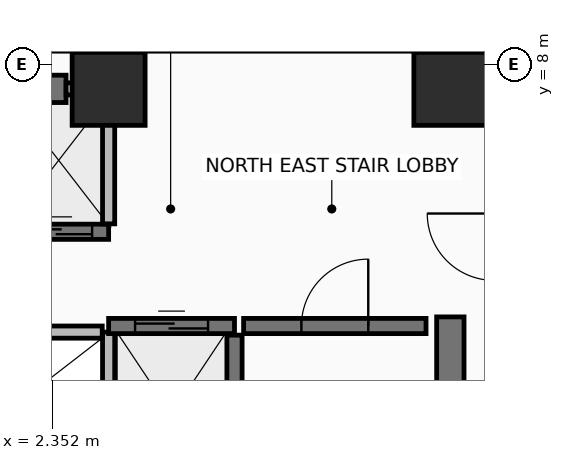
"""IFC4 building model, lengths in metres.
Left out: names, types, materials, properties, quantities, classifications, styles, units other than length and angle.
Written with IfcOpenShell. Run it as: python <this file> out.ifc"""

import sys

from ifc_helpers import new_model, si_unit, direction, frame, frame_2d, origin, origin_2d, place, context, subcontext, project, spatial, rectangle, extrude, element, fill, save


model = new_model("IFC4")
c1 = context("Model", 3, precision=1e-05, world=origin(), true_north=direction((0.0, 1.0)))
c2 = subcontext(c1, "Body", "Model", "MODEL_VIEW")
j1 = project(units=[si_unit("LENGTHUNIT", "METRE"), si_unit("PLANEANGLEUNIT", "RADIAN")], contexts=[c1])
p1 = place(None, origin())
s1 = spatial("IfcSite", under=j1, at=p1, CompositionType="ELEMENT")
p2 = place(p1, origin())
s2 = spatial("IfcBuilding", under=s1, at=p2, CompositionType="ELEMENT")
p3 = place(p2, frame((0.0, 0.0, 211.25)))
s3 = spatial("IfcBuildingStorey", under=s2, at=p3, CompositionType="ELEMENT", Elevation=211.25)
for number, where, z_axis, x_axis in (
    (1, (8.9, 7.6, 0.0), (0.0, 0.0, 1.0), (1.0, 0.0, 0.0)),
    (2, (3.28, 7.6, 0.0), (0.0, 0.0, 1.0), (1.0, 0.0, 0.0)),
):
    element("IfcColumn", number, at=place(p3, frame(where, z_axis=z_axis, x_axis=x_axis)), inside=s3, PredefinedType="COLUMN", context=c2, shape_type="SweptSolid", body=[
        extrude(rectangle(XDim=1.2, YDim=1.2, at=origin_2d()), origin(), (0.0, 0.0, 1.0), 3.6),
    ])
p4 = place(p3, frame((-2.8, 7.6, 0.0), z_axis=(0.0, 0.0, 1.0), x_axis=(1.0, 0.0, 0.0)))
e3 = element("IfcWall", 3, at=p4, inside=s3, PredefinedType="SHEAR", context=c2, shape_type="SweptSolid", body=[
    extrude(rectangle(XDim=5.38, YDim=0.45, at=frame_2d((2.69, 0.0))), origin(), (0.0, 0.0, 1.0), 3.42),
])
p5 = place(p3, frame((8.9, -6.85, 0.0), z_axis=(0.0, 0.0, 1.0), x_axis=(0.0, 1.0, 0.0)))
e4 = element("IfcWall", 4, at=p5, inside=s3, PredefinedType="SHEAR", context=c2, shape_type="SweptSolid", body=[
    extrude(rectangle(XDim=10.7, YDim=0.45, at=frame_2d((5.35, 0.0))), origin(), (0.0, 0.0, 1.0), 3.42),
])
p6 = place(p3, frame((5.35, -3.75, 0.0), z_axis=(0.0, 0.0, 1.0), x_axis=(0.0, 1.0, 0.0)))
e5 = element("IfcWall", 5, at=p6, inside=s3, PredefinedType="SHEAR", context=c2, shape_type="SweptSolid", body=[
    extrude(rectangle(XDim=7.3, YDim=0.25, at=frame_2d((3.65, 0.0))), origin(), (0.0, 0.0, 1.0), 3.42),
])
p7 = place(p3, frame((5.5, 3.7, 0.0), z_axis=(0.0, 0.0, 1.0), x_axis=(1.0, 0.0, 0.0)))
e6 = element("IfcWall", 6, at=p7, inside=s3, PredefinedType="SHEAR", context=c2, shape_type="SweptSolid", body=[
    extrude(rectangle(XDim=3.0, YDim=0.25, at=frame_2d((1.5, 0.0))), origin(), (0.0, 0.0, 1.0), 3.42),
])
p8 = place(p7, frame((0.95, 0.0, 0.0)))
e7 = element("IfcOpeningElement", 7, at=p8, cuts=e6, PredefinedType="OPENING", context=c2, shape_type="SweptSolid", body=[
    extrude(rectangle(XDim=1.1, YDim=2.15, at=frame_2d((0.55, 1.075))), frame((0.0, 0.135, 0.0), z_axis=(0.0, -1.0, 0.0), x_axis=(1.0, 0.0, 0.0)), (0.0, 0.0, 1.0), 0.27),
])
p9 = place(p3, frame((1.637, 5.25, 0.0), z_axis=(0.0, 0.0, 1.0), x_axis=(1.0, 0.0, 0.0)))
e8 = element("IfcWall", 8, at=p9, inside=s3, PredefinedType="SHEAR", context=c2, shape_type="SweptSolid", body=[
    extrude(rectangle(XDim=1.643, YDim=0.25, at=frame_2d((0.821, 0.0))), origin(), (0.0, 0.0, 1.0), 3.42),
])
p10 = place(p9, frame((0.271, 0.0, 0.0)))
e9 = element("IfcOpeningElement", 9, at=p10, cuts=e8, PredefinedType="OPENING", context=c2, shape_type="SweptSolid", body=[
    extrude(rectangle(XDim=1.1, YDim=2.2, at=frame_2d((0.55, 1.1))), frame((0.0, 0.135, 0.0), z_axis=(0.0, -1.0, 0.0), x_axis=(1.0, 0.0, 0.0)), (0.0, 0.0, 1.0), 0.27),
])
p11 = place(p3, frame((2.58, 7.6, 0.0), z_axis=(0.0, 0.0, 1.0), x_axis=(1.0, 0.0, 0.0)))
e10 = element("IfcWall", 10, at=p11, inside=s3, PredefinedType="PARTITIONING", context=c2, shape_type="SweptSolid", body=[
    extrude(rectangle(XDim=0.7, YDim=0.2, at=frame_2d((0.35, 0.0))), origin(), (0.0, 0.0, 1.0), 2.715),
])
p12 = place(p3, frame((3.28, 5.38, 0.0), z_axis=(0.0, 0.0, 1.0), x_axis=(0.0, 1.0, 0.0)))
e11 = element("IfcWall", 11, at=p12, inside=s3, PredefinedType="PARTITIONING", context=c2, shape_type="SweptSolid", body=[
    extrude(rectangle(XDim=2.115, YDim=0.2, at=frame_2d((1.058, 0.0))), origin(), (0.0, 0.0, 1.0), 2.715),
])
p13 = place(p3, frame((3.28, 1.8, 0.0), z_axis=(0.0, 0.0, 1.0), x_axis=(0.0, 1.0, 0.0)))
e12 = element("IfcWall", 12, at=p13, inside=s3, PredefinedType="PARTITIONING", context=c2, shape_type="SweptSolid", body=[
    extrude(rectangle(XDim=1.8, YDim=0.2, at=frame_2d((0.9, 0.0))), origin(), (0.0, 0.0, 1.0), 3.42),
])
p14 = place(p3, frame((1.13, 3.6, 0.0), z_axis=(0.0, 0.0, 1.0), x_axis=(1.0, 0.0, 0.0)))
e13 = element("IfcWall", 13, at=p14, inside=s3, PredefinedType="PARTITIONING", context=c2, shape_type="SweptSolid", body=[
    extrude(rectangle(XDim=2.045, YDim=0.2, at=frame_2d((1.022, 0.0))), origin(), (0.0, 0.0, 1.0), 2.715),
])
p15 = place(p3, frame((3.28, 3.7, 0.0), z_axis=(0.0, 0.0, 1.0), x_axis=(1.0, 0.0, 0.0)))
e14 = element("IfcWall", 14, at=p15, inside=s3, PredefinedType="SHEAR", context=c2, shape_type="SweptSolid", body=[
    extrude(rectangle(XDim=2.07, YDim=0.25, at=frame_2d((1.035, 0.0))), origin(), (0.0, 0.0, 1.0), 3.42),
])
p16 = place(p15, frame((0.435, 0.0, 0.0)))
e15 = element("IfcOpeningElement", 15, at=p16, cuts=e14, PredefinedType="OPENING", context=c2, shape_type="SweptSolid", body=[
    extrude(rectangle(XDim=1.2, YDim=2.2, at=frame_2d((0.6, 1.1))), frame((0.0, 0.135, 0.0), z_axis=(0.0, -1.0, 0.0), x_axis=(1.0, 0.0, 0.0)), (0.0, 0.0, 1.0), 0.27),
])
p17 = place(p8, frame((1.1, 0.0, 0.0), z_axis=(0.0, 0.0, 1.0), x_axis=(-1.0, 0.0, 0.0)))
e16 = element("IfcDoor", 16, at=p17, inside=s3, OperationType="SINGLE_SWING_LEFT", PredefinedType="DOOR", context=c2, shape_type="SweptSolid", body=[
    extrude(rectangle(XDim=1.1, YDim=2.15, at=frame_2d((0.55, 1.075))), frame((0.0, 0.025, 0.0), z_axis=(0.0, -1.0, 0.0), x_axis=(1.0, 0.0, 0.0)), (0.0, 0.0, 1.0), 0.05),
])
fill(e7, e16)
p18 = place(p10, origin())
e17 = element("IfcDoor", 17, at=p18, inside=s3, OperationType="SLIDING_TO_LEFT", PredefinedType="DOOR", context=c2, shape_type="SweptSolid", body=[
    extrude(rectangle(XDim=1.1, YDim=2.2, at=frame_2d((0.55, 1.1))), frame((0.0, 0.025, 0.0), z_axis=(0.0, -1.0, 0.0), x_axis=(1.0, 0.0, 0.0)), (0.0, 0.0, 1.0), 0.05),
])
fill(e9, e17)
p19 = place(p16, origin())
e18 = element("IfcDoor", 18, at=p19, inside=s3, OperationType="SLIDING_TO_RIGHT", PredefinedType="DOOR", context=c2, shape_type="SweptSolid", body=[
    extrude(rectangle(XDim=1.2, YDim=2.2, at=frame_2d((0.6, 1.1))), frame((0.0, 0.025, 0.0), z_axis=(0.0, -1.0, 0.0), x_axis=(1.0, 0.0, 0.0)), (0.0, 0.0, 1.0), 0.05),
])
fill(e15, e18)
save(model, sys.argv[1])
